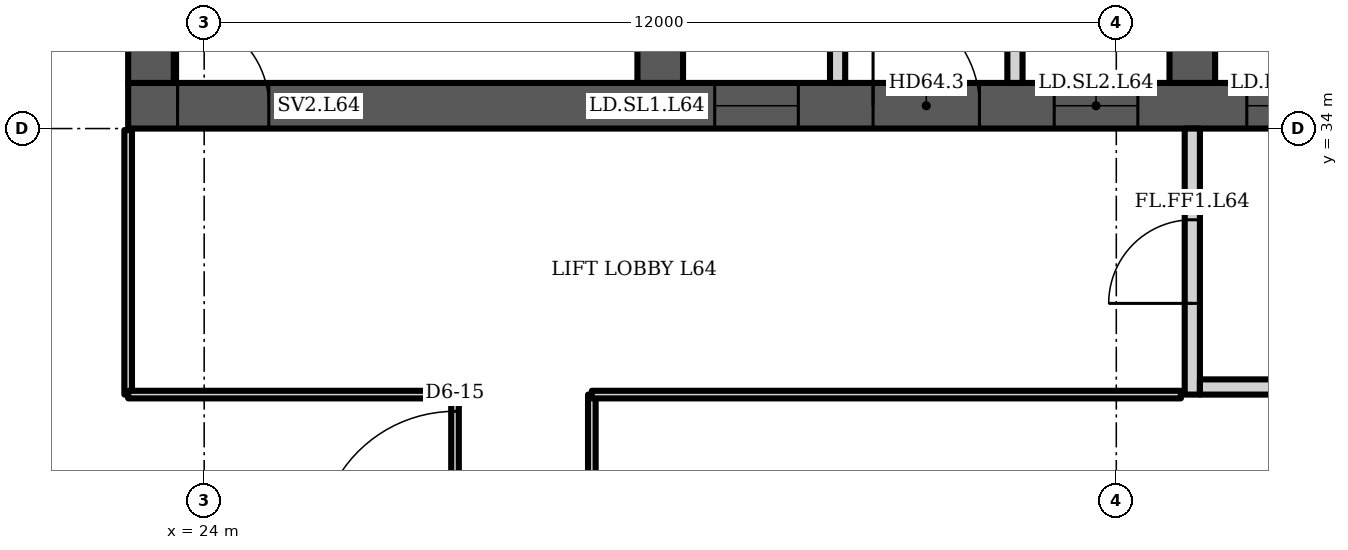
"""IFC4 building model, lengths in metres.
Left out: names, types, materials, properties, quantities, classifications, styles, units other than length and angle.
Written with IfcOpenShell. Run it as: python <this file> out.ifc"""

import sys

from ifc_helpers import new_model, si_unit, direction, frame, frame_2d, origin, place, context, subcontext, project, spatial, polyline, rectangle, outline, extrude, element, fill, save


model = new_model("IFC4")
c1 = context("Model", 3, precision=1e-05, world=origin(), true_north=direction((0.0, 1.0)))
c2 = subcontext(c1, "Body", "Model", "MODEL_VIEW")
j1 = project(units=[si_unit("LENGTHUNIT", "METRE"), si_unit("PLANEANGLEUNIT", "RADIAN")], contexts=[c1])
p1 = place(None, origin())
s1 = spatial("IfcSite", under=j1, at=p1, CompositionType="ELEMENT")
p2 = place(p1, origin())
s2 = spatial("IfcBuilding", under=s1, at=p2, CompositionType="ELEMENT")
p3 = place(p2, frame((0.0, 0.0, 253.9)))
s3 = spatial("IfcBuildingStorey", under=s2, at=p3, CompositionType="ELEMENT", Elevation=253.9)
p4 = place(p3, frame((23.0, 34.3, 0.0), z_axis=(0.0, 0.0, 1.0), x_axis=(1.0, 0.0, 0.0)))
e1 = element("IfcWall", 1, at=p4, inside=s3, PredefinedType="SHEAR", context=c2, shape_type="SweptSolid", body=[
    extrude(rectangle(XDim=35.0, YDim=0.6, at=frame_2d((17.5, 0.0))), origin(), (0.0, 0.0, 1.0), 3.6),
])
p5 = place(p4, frame((0.65, 0.0, 0.0)))
e2 = element("IfcOpeningElement", 2, at=p5, cuts=e1, PredefinedType="OPENING", context=c2, shape_type="SweptSolid", body=[
    extrude(rectangle(XDim=1.2, YDim=2.1, at=frame_2d((0.6, 1.05))), frame((0.0, 0.31, 0.0), z_axis=(0.0, -1.0, 0.0), x_axis=(1.0, 0.0, 0.0)), (0.0, 0.0, 1.0), 0.62),
])
p6 = place(p4, frame((7.717, 0.0, 0.0)))
e3 = element("IfcOpeningElement", 3, at=p6, cuts=e1, PredefinedType="OPENING", context=c2, shape_type="SweptSolid", body=[
    extrude(rectangle(XDim=1.1, YDim=2.1, at=frame_2d((0.55, 1.05))), frame((0.0, 0.31, 0.0), z_axis=(0.0, -1.0, 0.0), x_axis=(1.0, 0.0, 0.0)), (0.0, 0.0, 1.0), 0.62),
])
p7 = place(p4, frame((12.183, 0.0, 0.0)))
e4 = element("IfcOpeningElement", 4, at=p7, cuts=e1, PredefinedType="OPENING", context=c2, shape_type="SweptSolid", body=[
    extrude(rectangle(XDim=1.1, YDim=2.1, at=frame_2d((0.55, 1.05))), frame((0.0, 0.31, 0.0), z_axis=(0.0, -1.0, 0.0), x_axis=(1.0, 0.0, 0.0)), (0.0, 0.0, 1.0), 0.62),
])
p8 = place(p4, frame((9.8, 0.0, 0.0)))
e5 = element("IfcOpeningElement", 5, at=p8, cuts=e1, PredefinedType="OPENING", context=c2, shape_type="SweptSolid", body=[
    extrude(rectangle(XDim=1.4, YDim=2.1, at=frame_2d((0.7, 1.05))), frame((0.0, 0.31, 0.0), z_axis=(0.0, -1.0, 0.0), x_axis=(1.0, 0.0, 0.0)), (0.0, 0.0, 1.0), 0.62),
])
p9 = place(p4, frame((14.717, 0.0, 0.0)))
e6 = element("IfcOpeningElement", 6, at=p9, cuts=e1, PredefinedType="OPENING", context=c2, shape_type="SweptSolid", body=[
    extrude(rectangle(XDim=1.1, YDim=2.1, at=frame_2d((0.55, 1.05))), frame((0.0, 0.31, 0.0), z_axis=(0.0, -1.0, 0.0), x_axis=(1.0, 0.0, 0.0)), (0.0, 0.0, 1.0), 0.62),
])
p10 = place(p4, frame((16.95, 0.0, 0.0)))
e7 = element("IfcOpeningElement", 7, at=p10, cuts=e1, PredefinedType="OPENING", context=c2, shape_type="SweptSolid", body=[
    extrude(rectangle(XDim=1.1, YDim=2.1, at=frame_2d((0.55, 1.05))), frame((0.0, 0.31, 0.0), z_axis=(0.0, -1.0, 0.0), x_axis=(1.0, 0.0, 0.0)), (0.0, 0.0, 1.0), 0.62),
])
p11 = place(p4, frame((19.183, 0.0, 0.0)))
e8 = element("IfcOpeningElement", 8, at=p11, cuts=e1, PredefinedType="OPENING", context=c2, shape_type="SweptSolid", body=[
    extrude(rectangle(XDim=1.1, YDim=2.1, at=frame_2d((0.55, 1.05))), frame((0.0, 0.31, 0.0), z_axis=(0.0, -1.0, 0.0), x_axis=(1.0, 0.0, 0.0)), (0.0, 0.0, 1.0), 0.62),
])
p12 = place(p4, frame((26.15, 0.0, 0.0)))
e9 = element("IfcOpeningElement", 9, at=p12, cuts=e1, PredefinedType="OPENING", context=c2, shape_type="SweptSolid", body=[
    extrude(rectangle(XDim=1.2, YDim=2.1, at=frame_2d((0.6, 1.05))), frame((0.0, 0.31, 0.0), z_axis=(0.0, -1.0, 0.0), x_axis=(1.0, 0.0, 0.0)), (0.0, 0.0, 1.0), 0.62),
])
p13 = place(p4, frame((28.767, 0.0, 0.0)))
e10 = element("IfcOpeningElement", 10, at=p13, cuts=e1, PredefinedType="OPENING", context=c2, shape_type="SweptSolid", body=[
    extrude(rectangle(XDim=1.0, YDim=2.1, at=frame_2d((0.5, 1.05))), frame((0.0, 0.31, 0.0), z_axis=(0.0, -1.0, 0.0), x_axis=(1.0, 0.0, 0.0)), (0.0, 0.0, 1.0), 0.62),
])
p14 = place(p4, frame((33.083, 0.0, 0.0)))
e11 = element("IfcOpeningElement", 11, at=p14, cuts=e1, PredefinedType="OPENING", context=c2, shape_type="SweptSolid", body=[
    extrude(rectangle(XDim=1.0, YDim=2.1, at=frame_2d((0.5, 1.05))), frame((0.0, 0.31, 0.0), z_axis=(0.0, -1.0, 0.0), x_axis=(1.0, 0.0, 0.0)), (0.0, 0.0, 1.0), 0.62),
])
p15 = place(p4, frame((30.8, 0.0, 0.0)))
e12 = element("IfcOpeningElement", 12, at=p15, cuts=e1, PredefinedType="OPENING", context=c2, shape_type="SweptSolid", body=[
    extrude(rectangle(XDim=1.4, YDim=2.1, at=frame_2d((0.7, 1.05))), frame((0.0, 0.31, 0.0), z_axis=(0.0, -1.0, 0.0), x_axis=(1.0, 0.0, 0.0)), (0.0, 0.0, 1.0), 0.62),
])
p16 = place(p3, frame((23.3, 34.6, 0.0), z_axis=(0.0, 0.0, 1.0), x_axis=(0.0, 1.0, 0.0)))
e13 = element("IfcWall", 13, at=p16, inside=s3, PredefinedType="SHEAR", context=c2, shape_type="SweptSolid", body=[
    extrude(rectangle(XDim=13.585, YDim=0.6, at=frame_2d((6.792, 0.0))), origin(), (0.0, 0.0, 1.0), 3.6),
])
p17 = place(p3, frame((30.0, 34.6, 0.0), z_axis=(0.0, 0.0, 1.0), x_axis=(0.0, 1.0, 0.0)))
e14 = element("IfcWall", 14, at=p17, inside=s3, PredefinedType="SHEAR", context=c2, shape_type="SweptSolid", body=[
    extrude(rectangle(XDim=14.171, YDim=0.6, at=frame_2d((7.085, 0.0))), origin(), (0.0, 0.0, 1.0), 3.6),
])
p18 = place(p17, frame((3.8, 0.0, 0.0)))
e15 = element("IfcOpeningElement", 15, at=p18, cuts=e14, PredefinedType="OPENING", context=c2, shape_type="SweptSolid", body=[
    extrude(rectangle(XDim=1.1, YDim=2.1, at=frame_2d((0.55, 1.05))), frame((0.0, 0.31, 0.0), z_axis=(0.0, -1.0, 0.0), x_axis=(1.0, 0.0, 0.0)), (0.0, 0.0, 1.0), 0.62),
])
p19 = place(p3, frame((37.0, 34.6, 0.0), z_axis=(0.0, 0.0, 1.0), x_axis=(0.0, 1.0, 0.0)))
e16 = element("IfcWall", 16, at=p19, inside=s3, PredefinedType="SHEAR", context=c2, shape_type="SweptSolid", body=[
    extrude(rectangle(XDim=14.784, YDim=0.6, at=frame_2d((7.392, 0.0))), origin(), (0.0, 0.0, 1.0), 3.6),
])
p20 = place(p19, frame((11.302, 0.0, 0.0)))
e17 = element("IfcOpeningElement", 17, at=p20, cuts=e16, PredefinedType="OPENING", context=c2, shape_type="SweptSolid", body=[
    extrude(rectangle(XDim=1.0, YDim=2.1, at=frame_2d((0.5, 1.05))), frame((0.0, 0.31, 0.0), z_axis=(0.0, -1.0, 0.0), x_axis=(1.0, 0.0, 0.0)), (0.0, 0.0, 1.0), 0.62),
])
p21 = place(p19, frame((3.8, 0.0, 0.0)))
e18 = element("IfcOpeningElement", 18, at=p21, cuts=e16, PredefinedType="OPENING", context=c2, shape_type="SweptSolid", body=[
    extrude(rectangle(XDim=1.1, YDim=2.1, at=frame_2d((0.55, 1.05))), frame((0.0, 0.31, 0.0), z_axis=(0.0, -1.0, 0.0), x_axis=(1.0, 0.0, 0.0)), (0.0, 0.0, 1.0), 0.62),
])
p22 = place(p3, origin())
e19 = element("IfcWall", 19, at=p22, inside=s3, PredefinedType="PARTITIONING", context=c2, shape_type="SweptSolid", body=[
    extrude(outline(polyline([(32.233, 37.45), (30.3, 37.45), (30.3, 37.65), (32.233, 37.65), (32.433, 37.65), (32.433, 34.6), (32.233, 34.6), (32.233, 37.45)])), origin(), (0.0, 0.0, 1.0), 3.2),
])
p23 = place(p3, origin())
e20 = element("IfcWall", 20, at=p23, inside=s3, PredefinedType="PARTITIONING", context=c2, shape_type="SweptSolid", body=[
    extrude(outline(polyline([(34.567, 37.65), (34.767, 37.65), (36.7, 37.65), (36.7, 37.45), (34.767, 37.45), (34.767, 34.6), (34.567, 34.6), (34.567, 37.65)])), origin(), (0.0, 0.0, 1.0), 3.2),
])
p24 = place(p3, origin())
e21 = element("IfcWall", 21, at=p24, inside=s3, PredefinedType="PARTITIONING", context=c2, shape_type="SweptSolid", body=[
    extrude(outline(polyline([(41.567, 37.1), (39.433, 37.1), (39.433, 34.6), (39.233, 34.6), (39.233, 37.45), (37.3, 37.45), (37.3, 37.65), (39.233, 37.65), (39.433, 37.65), (39.433, 37.3), (41.567, 37.3), (41.567, 37.35), (41.767, 37.35), (43.7, 37.35), (43.7, 37.15), (41.767, 37.15), (41.767, 34.6), (41.567, 34.6), (41.567, 37.1)])), origin(), (0.0, 0.0, 1.0), 3.2),
])
p25 = place(p3, frame((37.0, 30.5, 0.0), z_axis=(0.0, 0.0, 1.0), x_axis=(0.0, 1.0, 0.0)))
e22 = element("IfcWall", 22, at=p25, inside=s3, PredefinedType="PARTITIONING", context=c2, shape_type="SweptSolid", body=[
    extrude(rectangle(XDim=3.5, YDim=0.2, at=frame_2d((1.75, 0.0))), origin(), (0.0, 0.0, 1.0), 3.2),
])
p26 = place(p25, frame((1.2, 0.0, 0.0)))
e23 = element("IfcOpeningElement", 23, at=p26, cuts=e22, PredefinedType="OPENING", context=c2, shape_type="SweptSolid", body=[
    extrude(rectangle(XDim=1.1, YDim=2.1, at=frame_2d((0.55, 1.05))), frame((0.0, 0.11, 0.0), z_axis=(0.0, -1.0, 0.0), x_axis=(1.0, 0.0, 0.0)), (0.0, 0.0, 1.0), 0.22),
])
p27 = place(p3, frame((37.1, 30.6, 0.0), z_axis=(0.0, 0.0, 1.0), x_axis=(1.0, 0.0, 0.0)))
e24 = element("IfcWall", 24, at=p27, inside=s3, PredefinedType="PARTITIONING", context=c2, shape_type="SweptSolid", body=[
    extrude(rectangle(XDim=2.8, YDim=0.2, at=frame_2d((1.4, 0.0))), origin(), (0.0, 0.0, 1.0), 3.2),
])
p28 = place(p3, frame((23.0, 30.5, 0.0), z_axis=(0.0, 0.0, 1.0), x_axis=(0.0, 1.0, 0.0)))
e25 = element("IfcWall", 25, at=p28, inside=s3, PredefinedType="PARTITIONING", context=c2, shape_type="SweptSolid", body=[
    extrude(rectangle(XDim=3.48, YDim=0.1, at=frame_2d((1.74, 0.0))), origin(), (0.0, 0.0, 1.0), 3.2),
])
p29 = place(p3, frame((23.0, 30.5, 0.0), z_axis=(0.0, 0.0, 1.0), x_axis=(1.0, 0.0, 0.0)))
e26 = element("IfcWall", 26, at=p29, inside=s3, PredefinedType="PARTITIONING", context=c2, shape_type="SweptSolid", body=[
    extrude(rectangle(XDim=4.3, YDim=0.1, at=frame_2d((2.15, 0.0))), origin(), (0.0, 0.0, 1.0), 3.2),
])
p30 = place(p3, frame((27.3, 23.25, 0.0), z_axis=(0.0, 0.0, 1.0), x_axis=(0.0, 1.0, 0.0)))
e27 = element("IfcWall", 27, at=p30, inside=s3, PredefinedType="PARTITIONING", context=c2, shape_type="SweptSolid", body=[
    extrude(rectangle(XDim=7.25, YDim=0.1, at=frame_2d((3.625, 0.0))), origin(), (0.0, 0.0, 1.0), 3.2),
])
p31 = place(p30, frame((5.23, 0.0, 0.0)))
e28 = element("IfcOpeningElement", 28, at=p31, cuts=e27, PredefinedType="OPENING", context=c2, shape_type="SweptSolid", body=[
    extrude(rectangle(XDim=1.8, YDim=2.1, at=frame_2d((0.9, 1.05))), frame((0.0, 0.06, 0.0), z_axis=(0.0, -1.0, 0.0), x_axis=(1.0, 0.0, 0.0)), (0.0, 0.0, 1.0), 0.12),
])
p32 = place(p3, frame((29.1, 5.725, 0.0), z_axis=(0.0, 0.0, 1.0), x_axis=(0.0, 1.0, 0.0)))
e29 = element("IfcWall", 29, at=p32, inside=s3, PredefinedType="PARTITIONING", context=c2, shape_type="SweptSolid", body=[
    extrude(rectangle(XDim=24.775, YDim=0.1, at=frame_2d((12.387, 0.0))), origin(), (0.0, 0.0, 1.0), 3.2),
])
p33 = place(p32, frame((5.22, 0.0, 0.0)))
e30 = element("IfcOpeningElement", 30, at=p33, cuts=e29, PredefinedType="OPENING", context=c2, shape_type="SweptSolid", body=[
    extrude(rectangle(XDim=1.0, YDim=2.1, at=frame_2d((0.5, 1.05))), frame((0.0, 0.06, 0.0), z_axis=(0.0, -1.0, 0.0), x_axis=(1.0, 0.0, 0.0)), (0.0, 0.0, 1.0), 0.12),
])
p34 = place(p32, frame((17.095, 0.0, 0.0)))
e31 = element("IfcOpeningElement", 31, at=p34, cuts=e29, PredefinedType="OPENING", context=c2, shape_type="SweptSolid", body=[
    extrude(rectangle(XDim=1.8, YDim=2.1, at=frame_2d((0.9, 1.05))), frame((0.0, 0.06, 0.0), z_axis=(0.0, -1.0, 0.0), x_axis=(1.0, 0.0, 0.0)), (0.0, 0.0, 1.0), 0.12),
])
p35 = place(p3, frame((29.1, 30.5, 0.0), z_axis=(0.0, 0.0, 1.0), x_axis=(1.0, 0.0, 0.0)))
e32 = element("IfcWall", 32, at=p35, inside=s3, PredefinedType="PARTITIONING", context=c2, shape_type="SweptSolid", body=[
    extrude(rectangle(XDim=7.75, YDim=0.1, at=frame_2d((3.875, 0.0))), origin(), (0.0, 0.0, 1.0), 3.2),
])
p36 = place(p5, origin())
e33 = element("IfcDoor", 33, at=p36, inside=s3, OperationType="SINGLE_SWING_LEFT", PredefinedType="DOOR", context=c2, shape_type="SweptSolid", body=[
    extrude(rectangle(XDim=1.2, YDim=2.1, at=frame_2d((0.6, 1.05))), frame((0.0, 0.025, 0.0), z_axis=(0.0, -1.0, 0.0), x_axis=(1.0, 0.0, 0.0)), (0.0, 0.0, 1.0), 0.05),
])
fill(e2, e33)
p37 = place(p6, origin())
e34 = element("IfcDoor", 34, at=p37, inside=s3, OperationType="DOUBLE_DOOR_SLIDING", PredefinedType="DOOR", context=c2, shape_type="SweptSolid", body=[
    extrude(rectangle(XDim=1.1, YDim=2.1, at=frame_2d((0.55, 1.05))), frame((0.0, 0.025, 0.0), z_axis=(0.0, -1.0, 0.0), x_axis=(1.0, 0.0, 0.0)), (0.0, 0.0, 1.0), 0.05),
])
fill(e3, e34)
p38 = place(p7, origin())
e35 = element("IfcDoor", 35, at=p38, inside=s3, OperationType="DOUBLE_DOOR_SLIDING", PredefinedType="DOOR", context=c2, shape_type="SweptSolid", body=[
    extrude(rectangle(XDim=1.1, YDim=2.1, at=frame_2d((0.55, 1.05))), frame((0.0, 0.025, 0.0), z_axis=(0.0, -1.0, 0.0), x_axis=(1.0, 0.0, 0.0)), (0.0, 0.0, 1.0), 0.05),
])
fill(e4, e35)
p39 = place(p8, origin())
e36 = element("IfcDoor", 36, at=p39, inside=s3, OperationType="DOUBLE_DOOR_SINGLE_SWING", PredefinedType="DOOR", context=c2, shape_type="SweptSolid", body=[
    extrude(rectangle(XDim=1.4, YDim=2.1, at=frame_2d((0.7, 1.05))), frame((0.0, 0.025, 0.0), z_axis=(0.0, -1.0, 0.0), x_axis=(1.0, 0.0, 0.0)), (0.0, 0.0, 1.0), 0.05),
])
fill(e5, e36)
p40 = place(p9, origin())
e37 = element("IfcDoor", 37, at=p40, inside=s3, OperationType="DOUBLE_DOOR_SLIDING", PredefinedType="DOOR", context=c2, shape_type="SweptSolid", body=[
    extrude(rectangle(XDim=1.1, YDim=2.1, at=frame_2d((0.55, 1.05))), frame((0.0, 0.025, 0.0), z_axis=(0.0, -1.0, 0.0), x_axis=(1.0, 0.0, 0.0)), (0.0, 0.0, 1.0), 0.05),
])
fill(e6, e37)
p41 = place(p26, origin())
e38 = element("IfcDoor", 38, at=p41, inside=s3, OperationType="SINGLE_SWING_LEFT", PredefinedType="DOOR", context=c2, shape_type="SweptSolid", body=[
    extrude(rectangle(XDim=1.1, YDim=2.1, at=frame_2d((0.55, 1.05))), frame((0.0, 0.025, 0.0), z_axis=(0.0, -1.0, 0.0), x_axis=(1.0, 0.0, 0.0)), (0.0, 0.0, 1.0), 0.05),
])
fill(e23, e38)
p42 = place(p31, origin())
e39 = element("IfcDoor", 39, at=p42, inside=s3, OperationType="DOUBLE_DOOR_SINGLE_SWING", PredefinedType="DOOR", context=c2, shape_type="SweptSolid", body=[
    extrude(rectangle(XDim=1.8, YDim=2.1, at=frame_2d((0.9, 1.05))), frame((0.0, 0.025, 0.0), z_axis=(0.0, -1.0, 0.0), x_axis=(1.0, 0.0, 0.0)), (0.0, 0.0, 1.0), 0.05),
])
fill(e28, e39)
save(model, sys.argv[1])
